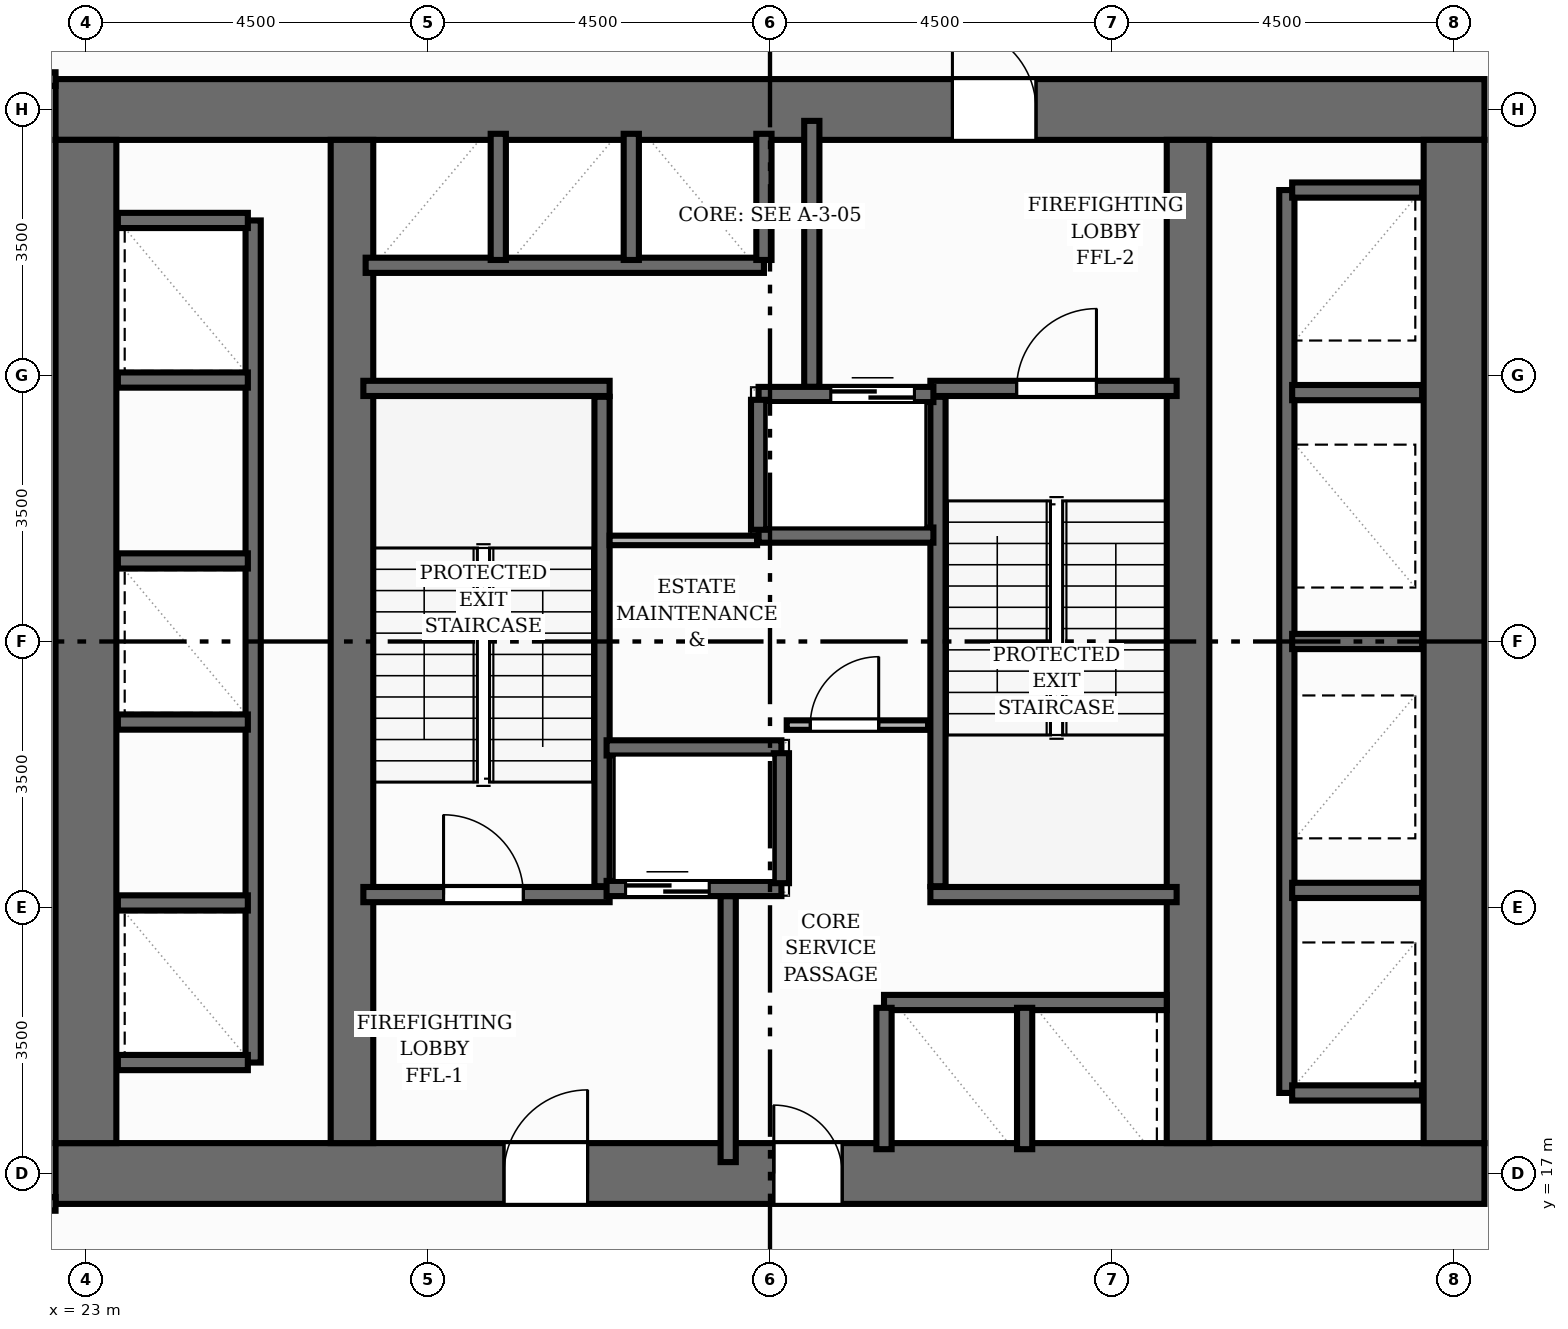
"""IFC4 building model, lengths in metres.
Left out: names, types, materials, properties, quantities, classifications, styles, units other than length and angle.
Written with IfcOpenShell. Run it as: python <this file> out.ifc"""

import sys

from ifc_helpers import new_model, si_unit, direction, frame, frame_2d, origin, place, context, subcontext, project, spatial, rectangle, extrude, element, fill, save


model = new_model("IFC4")
c1 = context("Model", 3, precision=1e-05, world=origin(), true_north=direction((0.0, 1.0)))
c2 = subcontext(c1, "Body", "Model", "MODEL_VIEW")
j1 = project(units=[si_unit("LENGTHUNIT", "METRE"), si_unit("PLANEANGLEUNIT", "RADIAN")], contexts=[c1])
p1 = place(None, origin())
s1 = spatial("IfcSite", under=j1, at=p1, CompositionType="ELEMENT")
p2 = place(p1, origin())
s2 = spatial("IfcBuilding", under=s1, at=p2, CompositionType="ELEMENT")
p3 = place(p2, frame((0.0, 0.0, 16.0)))
s3 = spatial("IfcBuildingStorey", under=s2, at=p3, CompositionType="ELEMENT", Elevation=16.0)
p4 = place(p3, frame((22.6, 17.0, 0.0), z_axis=(0.0, 0.0, 1.0), x_axis=(1.0, 0.0, 0.0)))
e1 = element("IfcWall", 1, at=p4, inside=s3, PredefinedType="SHEAR", context=c2, shape_type="SweptSolid", body=[
    extrude(rectangle(XDim=18.8, YDim=0.8, at=frame_2d((9.4, 0.0))), origin(), (0.0, 0.0, 1.0), 4.0),
])
p5 = place(p4, frame((5.9, 0.0, 0.0)))
e2 = element("IfcOpeningElement", 2, at=p5, cuts=e1, PredefinedType="OPENING", context=c2, shape_type="SweptSolid", body=[
    extrude(rectangle(XDim=1.1, YDim=2.15, at=frame_2d((0.55, 1.075))), frame((0.0, 0.41, 0.0), z_axis=(0.0, -1.0, 0.0), x_axis=(1.0, 0.0, 0.0)), (0.0, 0.0, 1.0), 0.82),
])
p6 = place(p4, frame((9.45, 0.0, 0.0)))
e3 = element("IfcOpeningElement", 3, at=p6, cuts=e1, PredefinedType="OPENING", context=c2, shape_type="SweptSolid", body=[
    extrude(rectangle(XDim=0.9, YDim=2.1, at=frame_2d((0.45, 1.05))), frame((0.0, 0.41, 0.0), z_axis=(0.0, -1.0, 0.0), x_axis=(1.0, 0.0, 0.0)), (0.0, 0.0, 1.0), 0.82),
])
p7 = place(p3, frame((22.6, 31.0, 0.0), z_axis=(0.0, 0.0, 1.0), x_axis=(1.0, 0.0, 0.0)))
e4 = element("IfcWall", 4, at=p7, inside=s3, PredefinedType="SHEAR", context=c2, shape_type="SweptSolid", body=[
    extrude(rectangle(XDim=18.8, YDim=0.8, at=frame_2d((9.4, 0.0))), origin(), (0.0, 0.0, 1.0), 4.0),
])
p8 = place(p7, frame((11.8, 0.0, 0.0)))
e5 = element("IfcOpeningElement", 5, at=p8, cuts=e4, PredefinedType="OPENING", context=c2, shape_type="SweptSolid", body=[
    extrude(rectangle(XDim=1.1, YDim=2.15, at=frame_2d((0.55, 1.075))), frame((0.0, 0.41, 0.0), z_axis=(0.0, -1.0, 0.0), x_axis=(1.0, 0.0, 0.0)), (0.0, 0.0, 1.0), 0.82),
])
for number, where, z_axis, x_axis in (
    (6, (23.0, 17.4, 0.0), (0.0, 0.0, 1.0), (0.0, 1.0, 0.0)),
    (7, (41.0, 17.4, 0.0), (0.0, 0.0, 1.0), (0.0, 1.0, 0.0)),
):
    element("IfcWall", number, at=place(p3, frame(where, z_axis=z_axis, x_axis=x_axis)), inside=s3, PredefinedType="SHEAR", context=c2, shape_type="SweptSolid", body=[
        extrude(rectangle(XDim=13.2, YDim=0.8, at=frame_2d((6.6, 0.0))), origin(), (0.0, 0.0, 1.0), 4.0),
    ])
for number, where, z_axis, x_axis in (
    (8, (26.5, 17.4, 0.0), (0.0, 0.0, 1.0), (0.0, 1.0, 0.0)),
    (9, (37.5, 17.4, 0.0), (0.0, 0.0, 1.0), (0.0, 1.0, 0.0)),
):
    element("IfcWall", number, at=place(p3, frame(where, z_axis=z_axis, x_axis=x_axis)), inside=s3, PredefinedType="SHEAR", context=c2, shape_type="SweptSolid", body=[
        extrude(rectangle(XDim=13.2, YDim=0.56, at=frame_2d((6.6, 0.0))), origin(), (0.0, 0.0, 1.0), 4.0),
    ])
p9 = place(p3, frame((29.79, 20.78, 0.0), z_axis=(0.0, 0.0, 1.0), x_axis=(0.0, 1.0, 0.0)))
e10 = element("IfcWall", 10, at=p9, inside=s3, PredefinedType="SHEAR", context=c2, shape_type="SweptSolid", body=[
    extrude(rectangle(XDim=6.44, YDim=0.2, at=frame_2d((3.22, 0.0))), origin(), (0.0, 0.0, 1.0), 4.0),
])
p10 = place(p3, frame((26.65, 27.33, 0.0), z_axis=(0.0, 0.0, 1.0), x_axis=(1.0, 0.0, 0.0)))
e11 = element("IfcWall", 11, at=p10, inside=s3, PredefinedType="SHEAR", context=c2, shape_type="SweptSolid", body=[
    extrude(rectangle(XDim=3.24, YDim=0.2, at=frame_2d((1.62, 0.0))), origin(), (0.0, 0.0, 1.0), 4.0),
])
p11 = place(p3, frame((26.65, 20.67, 0.0), z_axis=(0.0, 0.0, 1.0), x_axis=(1.0, 0.0, 0.0)))
e12 = element("IfcWall", 12, at=p11, inside=s3, PredefinedType="SHEAR", context=c2, shape_type="SweptSolid", body=[
    extrude(rectangle(XDim=3.24, YDim=0.2, at=frame_2d((1.62, 0.0))), origin(), (0.0, 0.0, 1.0), 4.0),
])
p12 = place(p11, frame((1.055, 0.0, 0.0)))
e13 = element("IfcOpeningElement", 13, at=p12, cuts=e12, PredefinedType="OPENING", context=c2, shape_type="SweptSolid", body=[
    extrude(rectangle(XDim=1.05, YDim=2.15, at=frame_2d((0.525, 1.075))), frame((0.0, 0.11, 0.0), z_axis=(0.0, -1.0, 0.0), x_axis=(1.0, 0.0, 0.0)), (0.0, 0.0, 1.0), 0.22),
])
p13 = place(p3, frame((34.21, 20.78, 0.0), z_axis=(0.0, 0.0, 1.0), x_axis=(0.0, 1.0, 0.0)))
e14 = element("IfcWall", 14, at=p13, inside=s3, PredefinedType="SHEAR", context=c2, shape_type="SweptSolid", body=[
    extrude(rectangle(XDim=6.44, YDim=0.2, at=frame_2d((3.22, 0.0))), origin(), (0.0, 0.0, 1.0), 4.0),
])
p14 = place(p3, frame((34.11, 20.67, 0.0), z_axis=(0.0, 0.0, 1.0), x_axis=(1.0, 0.0, 0.0)))
e15 = element("IfcWall", 15, at=p14, inside=s3, PredefinedType="SHEAR", context=c2, shape_type="SweptSolid", body=[
    extrude(rectangle(XDim=3.24, YDim=0.2, at=frame_2d((1.62, 0.0))), origin(), (0.0, 0.0, 1.0), 4.0),
])
p15 = place(p3, frame((34.11, 27.33, 0.0), z_axis=(0.0, 0.0, 1.0), x_axis=(1.0, 0.0, 0.0)))
e16 = element("IfcWall", 16, at=p15, inside=s3, PredefinedType="SHEAR", context=c2, shape_type="SweptSolid", body=[
    extrude(rectangle(XDim=3.24, YDim=0.2, at=frame_2d((1.62, 0.0))), origin(), (0.0, 0.0, 1.0), 4.0),
])
p16 = place(p15, frame((1.135, 0.0, 0.0)))
e17 = element("IfcOpeningElement", 17, at=p16, cuts=e16, PredefinedType="OPENING", context=c2, shape_type="SweptSolid", body=[
    extrude(rectangle(XDim=1.05, YDim=2.15, at=frame_2d((0.525, 1.075))), frame((0.0, 0.11, 0.0), z_axis=(0.0, -1.0, 0.0), x_axis=(1.0, 0.0, 0.0)), (0.0, 0.0, 1.0), 0.22),
])
for number, where, z_axis, x_axis in (
    (18, (31.45, 17.15, 0.0), (0.0, 0.0, 1.0), (0.0, 1.0, 0.0)),
    (19, (32.55, 27.35, 0.0), (0.0, 0.0, 1.0), (0.0, 1.0, 0.0)),
):
    element("IfcWall", number, at=place(p3, frame(where, z_axis=z_axis, x_axis=x_axis)), inside=s3, PredefinedType="SHEAR", context=c2, shape_type="SweptSolid", body=[
        extrude(rectangle(XDim=3.5, YDim=0.2, at=frame_2d((1.75, 0.0))), origin(), (0.0, 0.0, 1.0), 4.0),
    ])
p17 = place(p3, frame((29.85, 20.75, 0.0), z_axis=(0.0, 0.0, 1.0), x_axis=(1.0, 0.0, 0.0)))
e20 = element("IfcWall", 20, at=p17, inside=s3, PredefinedType="SHEAR", context=c2, shape_type="SweptSolid", body=[
    extrude(rectangle(XDim=2.3, YDim=0.2, at=frame_2d((1.15, 0.0))), origin(), (0.0, 0.0, 1.0), 4.0),
])
p18 = place(p17, frame((0.25, 0.0, 0.0)))
e21 = element("IfcOpeningElement", 21, at=p18, cuts=e20, PredefinedType="OPENING", context=c2, shape_type="SweptSolid", body=[
    extrude(rectangle(XDim=1.1, YDim=2.15, at=frame_2d((0.55, 1.075))), frame((0.0, 0.11, 0.0), z_axis=(0.0, -1.0, 0.0), x_axis=(1.0, 0.0, 0.0)), (0.0, 0.0, 1.0), 0.22),
])
p19 = place(p3, frame((29.85, 22.6, 0.0), z_axis=(0.0, 0.0, 1.0), x_axis=(1.0, 0.0, 0.0)))
e22 = element("IfcWall", 22, at=p19, inside=s3, PredefinedType="SHEAR", context=c2, shape_type="SweptSolid", body=[
    extrude(rectangle(XDim=2.3, YDim=0.2, at=frame_2d((1.15, 0.0))), origin(), (0.0, 0.0, 1.0), 4.0),
])
p20 = place(p3, frame((32.15, 20.82, 0.0), z_axis=(0.0, 0.0, 1.0), x_axis=(0.0, 1.0, 0.0)))
e23 = element("IfcWall", 23, at=p20, inside=s3, PredefinedType="SHEAR", context=c2, shape_type="SweptSolid", body=[
    extrude(rectangle(XDim=1.71, YDim=0.2, at=frame_2d((0.855, 0.0))), origin(), (0.0, 0.0, 1.0), 4.0),
])
p21 = place(p3, frame((31.85, 27.25, 0.0), z_axis=(0.0, 0.0, 1.0), x_axis=(1.0, 0.0, 0.0)))
e24 = element("IfcWall", 24, at=p21, inside=s3, PredefinedType="SHEAR", context=c2, shape_type="SweptSolid", body=[
    extrude(rectangle(XDim=2.3, YDim=0.2, at=frame_2d((1.15, 0.0))), origin(), (0.0, 0.0, 1.0), 4.0),
])
p22 = place(p21, frame((0.95, 0.0, 0.0)))
e25 = element("IfcOpeningElement", 25, at=p22, cuts=e24, PredefinedType="OPENING", context=c2, shape_type="SweptSolid", body=[
    extrude(rectangle(XDim=1.1, YDim=2.15, at=frame_2d((0.55, 1.075))), frame((0.0, 0.11, 0.0), z_axis=(0.0, -1.0, 0.0), x_axis=(1.0, 0.0, 0.0)), (0.0, 0.0, 1.0), 0.22),
])
p23 = place(p3, frame((31.85, 25.4, 0.0), z_axis=(0.0, 0.0, 1.0), x_axis=(1.0, 0.0, 0.0)))
e26 = element("IfcWall", 26, at=p23, inside=s3, PredefinedType="SHEAR", context=c2, shape_type="SweptSolid", body=[
    extrude(rectangle(XDim=2.3, YDim=0.2, at=frame_2d((1.15, 0.0))), origin(), (0.0, 0.0, 1.0), 4.0),
])
p24 = place(p3, frame((31.85, 25.47, 0.0), z_axis=(0.0, 0.0, 1.0), x_axis=(0.0, 1.0, 0.0)))
e27 = element("IfcWall", 27, at=p24, inside=s3, PredefinedType="SHEAR", context=c2, shape_type="SweptSolid", body=[
    extrude(rectangle(XDim=1.71, YDim=0.2, at=frame_2d((0.855, 0.0))), origin(), (0.0, 0.0, 1.0), 4.0),
])
p25 = place(p3, frame((38.8, 18.06, 0.0), z_axis=(0.0, 0.0, 1.0), x_axis=(0.0, 1.0, 0.0)))
e28 = element("IfcWall", 28, at=p25, inside=s3, PredefinedType="SHEAR", context=c2, shape_type="SweptSolid", body=[
    extrude(rectangle(XDim=11.88, YDim=0.2, at=frame_2d((5.94, 0.0))), origin(), (0.0, 0.0, 1.0), 4.0),
])
for number, where, z_axis, x_axis in (
    (29, (38.87, 18.06, 0.0), (0.0, 0.0, 1.0), (1.0, 0.0, 0.0)),
    (30, (38.87, 29.94, 0.0), (0.0, 0.0, 1.0), (1.0, 0.0, 0.0)),
    (31, (38.87, 20.725, 0.0), (0.0, 0.0, 1.0), (1.0, 0.0, 0.0)),
    (32, (38.87, 24.0, 0.0), (0.0, 0.0, 1.0), (1.0, 0.0, 0.0)),
    (33, (38.87, 27.275, 0.0), (0.0, 0.0, 1.0), (1.0, 0.0, 0.0)),
):
    element("IfcWall", number, at=place(p3, frame(where, z_axis=z_axis, x_axis=x_axis)), inside=s3, PredefinedType="SHEAR", context=c2, shape_type="SweptSolid", body=[
        extrude(rectangle(XDim=1.71, YDim=0.2, at=frame_2d((0.855, 0.0))), origin(), (0.0, 0.0, 1.0), 4.0),
    ])
p26 = place(p3, frame((25.2, 18.46, 0.0), z_axis=(0.0, 0.0, 1.0), x_axis=(0.0, 1.0, 0.0)))
e34 = element("IfcWall", 34, at=p26, inside=s3, PredefinedType="SHEAR", context=c2, shape_type="SweptSolid", body=[
    extrude(rectangle(XDim=11.08, YDim=0.2, at=frame_2d((5.54, 0.0))), origin(), (0.0, 0.0, 1.0), 4.0),
])
for number, where, z_axis, x_axis in (
    (35, (23.42, 18.46, 0.0), (0.0, 0.0, 1.0), (1.0, 0.0, 0.0)),
    (36, (23.42, 29.54, 0.0), (0.0, 0.0, 1.0), (1.0, 0.0, 0.0)),
    (37, (23.42, 20.56, 0.0), (0.0, 0.0, 1.0), (1.0, 0.0, 0.0)),
    (38, (23.42, 22.94, 0.0), (0.0, 0.0, 1.0), (1.0, 0.0, 0.0)),
    (39, (23.42, 25.06, 0.0), (0.0, 0.0, 1.0), (1.0, 0.0, 0.0)),
    (40, (23.42, 27.44, 0.0), (0.0, 0.0, 1.0), (1.0, 0.0, 0.0)),
):
    element("IfcWall", number, at=place(p3, frame(where, z_axis=z_axis, x_axis=x_axis)), inside=s3, PredefinedType="SHEAR", context=c2, shape_type="SweptSolid", body=[
        extrude(rectangle(XDim=1.71, YDim=0.2, at=frame_2d((0.855, 0.0))), origin(), (0.0, 0.0, 1.0), 4.0),
    ])
p27 = place(p3, frame((26.68, 28.95, 0.0), z_axis=(0.0, 0.0, 1.0), x_axis=(1.0, 0.0, 0.0)))
e41 = element("IfcWall", 41, at=p27, inside=s3, PredefinedType="SHEAR", context=c2, shape_type="SweptSolid", body=[
    extrude(rectangle(XDim=5.24, YDim=0.2, at=frame_2d((2.62, 0.0))), origin(), (0.0, 0.0, 1.0), 4.0),
])
for number, where, z_axis, x_axis in (
    (42, (31.92, 29.02, 0.0), (0.0, 0.0, 1.0), (0.0, 1.0, 0.0)),
    (43, (28.425, 29.02, 0.0), (0.0, 0.0, 1.0), (0.0, 1.0, 0.0)),
    (44, (30.175, 29.02, 0.0), (0.0, 0.0, 1.0), (0.0, 1.0, 0.0)),
):
    element("IfcWall", number, at=place(p3, frame(where, z_axis=z_axis, x_axis=x_axis)), inside=s3, PredefinedType="SHEAR", context=c2, shape_type="SweptSolid", body=[
        extrude(rectangle(XDim=1.66, YDim=0.2, at=frame_2d((0.83, 0.0))), origin(), (0.0, 0.0, 1.0), 4.0),
    ])
p28 = place(p3, frame((33.5, 19.25, 0.0), z_axis=(0.0, 0.0, 1.0), x_axis=(1.0, 0.0, 0.0)))
e45 = element("IfcWall", 45, at=p28, inside=s3, PredefinedType="SHEAR", context=c2, shape_type="SweptSolid", body=[
    extrude(rectangle(XDim=3.72, YDim=0.2, at=frame_2d((1.86, 0.0))), origin(), (0.0, 0.0, 1.0), 4.0),
])
for number, where, z_axis, x_axis in (
    (46, (33.5, 17.32, 0.0), (0.0, 0.0, 1.0), (0.0, 1.0, 0.0)),
    (47, (35.35, 17.32, 0.0), (0.0, 0.0, 1.0), (0.0, 1.0, 0.0)),
):
    element("IfcWall", number, at=place(p3, frame(where, z_axis=z_axis, x_axis=x_axis)), inside=s3, PredefinedType="SHEAR", context=c2, shape_type="SweptSolid", body=[
        extrude(rectangle(XDim=1.86, YDim=0.2, at=frame_2d((0.93, 0.0))), origin(), (0.0, 0.0, 1.0), 4.0),
    ])
p29 = place(p3, frame((32.22, 22.9, 0.0), z_axis=(0.0, 0.0, 1.0), x_axis=(1.0, 0.0, 0.0)))
e48 = element("IfcWall", 48, at=p29, inside=s3, PredefinedType="PARTITIONING", context=c2, shape_type="SweptSolid", body=[
    extrude(rectangle(XDim=1.86, YDim=0.125, at=frame_2d((0.93, 0.0))), origin(), (0.0, 0.0, 1.0), 3.545),
])
p30 = place(p29, frame((0.31, 0.0, 0.0)))
e49 = element("IfcOpeningElement", 49, at=p30, cuts=e48, PredefinedType="OPENING", context=c2, shape_type="SweptSolid", body=[
    extrude(rectangle(XDim=0.9, YDim=2.1, at=frame_2d((0.45, 1.05))), frame((0.0, 0.073, 0.0), z_axis=(0.0, -1.0, 0.0), x_axis=(1.0, 0.0, 0.0)), (0.0, 0.0, 1.0), 0.145),
])
p31 = place(p3, frame((29.89, 25.33, 0.0), z_axis=(0.0, 0.0, 1.0), x_axis=(1.0, 0.0, 0.0)))
e50 = element("IfcWall", 50, at=p31, inside=s3, PredefinedType="PARTITIONING", context=c2, shape_type="SweptSolid", body=[
    extrude(rectangle(XDim=1.94, YDim=0.125, at=frame_2d((0.97, 0.0))), origin(), (0.0, 0.0, 1.0), 3.545),
])
p32 = place(p3, frame((22.6, 31.4, 0.0), z_axis=(0.0, 0.0, 1.0), x_axis=(-1.0, 0.0, 0.0)))
e51 = element("IfcWall", 51, at=p32, inside=s3, PredefinedType="PARTITIONING", context=c2, shape_type="SweptSolid", body=[
    extrude(rectangle(XDim=2.77, YDim=0.18, at=frame_2d((1.385, 0.0))), origin(), (0.0, 0.0, 1.0), 3.545),
])
p33 = place(p32, frame((0.86, 0.0, 0.0)))
e52 = element("IfcOpeningElement", 52, at=p33, cuts=e51, PredefinedType="OPENING", context=c2, shape_type="SweptSolid", body=[
    extrude(rectangle(XDim=1.05, YDim=2.15, at=frame_2d((0.525, 1.075))), frame((0.0, 0.1, 0.0), z_axis=(0.0, -1.0, 0.0), x_axis=(1.0, 0.0, 0.0)), (0.0, 0.0, 1.0), 0.2),
])
p34 = place(p3, frame((19.83, 16.6, 0.0), z_axis=(0.0, 0.0, 1.0), x_axis=(1.0, 0.0, 0.0)))
e53 = element("IfcWall", 53, at=p34, inside=s3, PredefinedType="PARTITIONING", context=c2, shape_type="SweptSolid", body=[
    extrude(rectangle(XDim=2.77, YDim=0.18, at=frame_2d((1.385, 0.0))), origin(), (0.0, 0.0, 1.0), 2.838),
])
p35 = place(p12, origin())
e54 = element("IfcDoor", 54, at=p35, inside=s3, OperationType="SINGLE_SWING_LEFT", PredefinedType="DOOR", context=c2, shape_type="SweptSolid", body=[
    extrude(rectangle(XDim=1.05, YDim=2.15, at=frame_2d((0.525, 1.075))), frame((0.0, 0.025, 0.0), z_axis=(0.0, -1.0, 0.0), x_axis=(1.0, 0.0, 0.0)), (0.0, 0.0, 1.0), 0.05),
])
fill(e13, e54)
p36 = place(p16, origin())
e55 = element("IfcDoor", 55, at=p36, inside=s3, OperationType="SINGLE_SWING_RIGHT", PredefinedType="DOOR", context=c2, shape_type="SweptSolid", body=[
    extrude(rectangle(XDim=1.05, YDim=2.15, at=frame_2d((0.525, 1.075))), frame((0.0, 0.025, 0.0), z_axis=(0.0, -1.0, 0.0), x_axis=(1.0, 0.0, 0.0)), (0.0, 0.0, 1.0), 0.05),
])
fill(e17, e55)
p37 = place(p5, origin())
e56 = element("IfcDoor", 56, at=p37, inside=s3, OperationType="SINGLE_SWING_RIGHT", PredefinedType="DOOR", context=c2, shape_type="SweptSolid", body=[
    extrude(rectangle(XDim=1.1, YDim=2.15, at=frame_2d((0.55, 1.075))), frame((0.0, 0.025, 0.0), z_axis=(0.0, -1.0, 0.0), x_axis=(1.0, 0.0, 0.0)), (0.0, 0.0, 1.0), 0.05),
])
fill(e2, e56)
p38 = place(p8, origin())
e57 = element("IfcDoor", 57, at=p38, inside=s3, OperationType="SINGLE_SWING_LEFT", PredefinedType="DOOR", context=c2, shape_type="SweptSolid", body=[
    extrude(rectangle(XDim=1.1, YDim=2.15, at=frame_2d((0.55, 1.075))), frame((0.0, 0.025, 0.0), z_axis=(0.0, -1.0, 0.0), x_axis=(1.0, 0.0, 0.0)), (0.0, 0.0, 1.0), 0.05),
])
fill(e5, e57)
p39 = place(p18, origin())
e58 = element("IfcDoor", 58, at=p39, inside=s3, OperationType="DOUBLE_DOOR_SLIDING", PredefinedType="DOOR", context=c2, shape_type="SweptSolid", body=[
    extrude(rectangle(XDim=1.1, YDim=2.15, at=frame_2d((0.55, 1.075))), frame((0.0, 0.025, 0.0), z_axis=(0.0, -1.0, 0.0), x_axis=(1.0, 0.0, 0.0)), (0.0, 0.0, 1.0), 0.05),
])
fill(e21, e58)
p40 = place(p22, origin())
e59 = element("IfcDoor", 59, at=p40, inside=s3, OperationType="DOUBLE_DOOR_SLIDING", PredefinedType="DOOR", context=c2, shape_type="SweptSolid", body=[
    extrude(rectangle(XDim=1.1, YDim=2.15, at=frame_2d((0.55, 1.075))), frame((0.0, 0.025, 0.0), z_axis=(0.0, -1.0, 0.0), x_axis=(1.0, 0.0, 0.0)), (0.0, 0.0, 1.0), 0.05),
])
fill(e25, e59)
p41 = place(p6, origin())
e60 = element("IfcDoor", 60, at=p41, inside=s3, OperationType="SINGLE_SWING_LEFT", PredefinedType="DOOR", context=c2, shape_type="SweptSolid", body=[
    extrude(rectangle(XDim=0.9, YDim=2.1, at=frame_2d((0.45, 1.05))), frame((0.0, 0.025, 0.0), z_axis=(0.0, -1.0, 0.0), x_axis=(1.0, 0.0, 0.0)), (0.0, 0.0, 1.0), 0.05),
])
fill(e3, e60)
p42 = place(p30, origin())
e61 = element("IfcDoor", 61, at=p42, inside=s3, OperationType="SINGLE_SWING_RIGHT", PredefinedType="DOOR", context=c2, shape_type="SweptSolid", body=[
    extrude(rectangle(XDim=0.9, YDim=2.1, at=frame_2d((0.45, 1.05))), frame((0.0, 0.025, 0.0), z_axis=(0.0, -1.0, 0.0), x_axis=(1.0, 0.0, 0.0)), (0.0, 0.0, 1.0), 0.05),
])
fill(e49, e61)
save(model, sys.argv[1])
